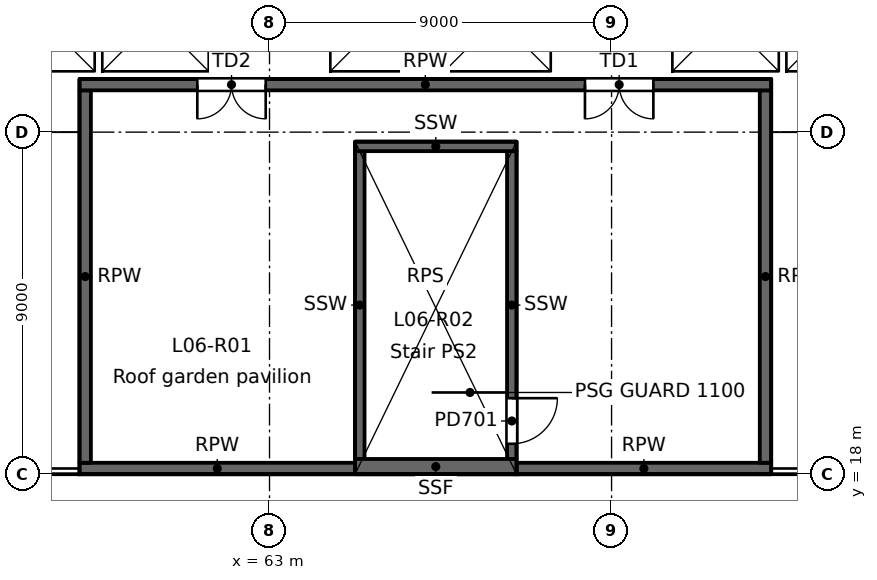
"""IFC4 building model, lengths in metres.
Left out: names, types, materials, properties, quantities, classifications, styles, units other than length and angle.
Written with IfcOpenShell. Run it as: python <this file> out.ifc"""

import sys

from ifc_helpers import new_model, si_unit, direction, frame, frame_2d, origin, origin_2d, place, context, subcontext, project, spatial, rectangle, extrude, element, fill, save


model = new_model("IFC4")
c1 = context("Model", 3, precision=1e-05, world=origin(), true_north=direction((0.0, 1.0)))
c2 = subcontext(c1, "Body", "Model", "MODEL_VIEW")
j1 = project(units=[si_unit("LENGTHUNIT", "METRE"), si_unit("PLANEANGLEUNIT", "RADIAN")], contexts=[c1])
p1 = place(None, origin())
s1 = spatial("IfcSite", under=j1, at=p1, CompositionType="ELEMENT")
p2 = place(p1, origin())
s2 = spatial("IfcBuilding", under=s1, at=p2, CompositionType="ELEMENT")
p3 = place(p2, frame((0.0, 0.0, 31.2)))
s3 = spatial("IfcBuildingStorey", under=s2, at=p3, CompositionType="ELEMENT", Elevation=31.2)
p4 = place(p3, frame((65.375, 18.4, 0.0), z_axis=(0.0, 0.0, 1.0), x_axis=(0.0, 1.0, 0.0)))
e1 = element("IfcWall", 1, at=p4, inside=s3, PredefinedType="SOLIDWALL", context=c2, shape_type="SweptSolid", body=[
    extrude(rectangle(XDim=8.1, YDim=0.25, at=frame_2d((4.05, 0.0))), origin(), (0.0, 0.0, 1.0), 2.7),
])
p5 = place(p3, frame((69.375, 26.5, 0.0), z_axis=(0.0, 0.0, 1.0), x_axis=(0.0, -1.0, 0.0)))
e2 = element("IfcWall", 2, at=p5, inside=s3, PredefinedType="SOLIDWALL", context=c2, shape_type="SweptSolid", body=[
    extrude(rectangle(XDim=8.1, YDim=0.25, at=frame_2d((4.05, 0.0))), origin(), (0.0, 0.0, 1.0), 2.7),
])
p6 = place(p5, frame((6.5, 0.0, 0.0)))
e3 = element("IfcOpeningElement", 3, at=p6, cuts=e2, PredefinedType="OPENING", context=c2, shape_type="SweptSolid", body=[
    extrude(rectangle(XDim=1.2, YDim=2.1, at=frame_2d((0.6, 1.05))), frame((0.0, 0.125, 0.0), z_axis=(0.0, -1.0, 0.0), x_axis=(1.0, 0.0, 0.0)), (0.0, 0.0, 1.0), 0.25),
])
p7 = place(p3, frame((65.25, 18.2, 0.0), z_axis=(0.0, 0.0, 1.0), x_axis=(1.0, 0.0, 0.0)))
e4 = element("IfcWall", 4, at=p7, inside=s3, PredefinedType="SOLIDWALL", context=c2, shape_type="SweptSolid", body=[
    extrude(rectangle(XDim=4.25, YDim=0.4, at=frame_2d((2.125, 0.0))), origin(), (0.0, 0.0, 1.0), 2.7),
])
p8 = place(p3, frame((65.25, 26.625, 0.0), z_axis=(0.0, 0.0, 1.0), x_axis=(1.0, 0.0, 0.0)))
e5 = element("IfcWall", 5, at=p8, inside=s3, PredefinedType="SOLIDWALL", context=c2, shape_type="SweptSolid", body=[
    extrude(rectangle(XDim=4.25, YDim=0.25, at=frame_2d((2.125, 0.0))), origin(), (0.0, 0.0, 1.0), 2.7),
])
p9 = place(p3, frame((58.0, 18.15, 0.0), z_axis=(0.0, 0.0, 1.0), x_axis=(1.0, 0.0, 0.0)))
e6 = element("IfcWall", 6, at=p9, inside=s3, PredefinedType="SOLIDWALL", context=c2, shape_type="SweptSolid", body=[
    extrude(rectangle(XDim=7.25, YDim=0.3, at=frame_2d((3.625, 0.0))), origin(), (0.0, 0.0, 1.0), 2.7),
])
p10 = place(p3, frame((69.5, 18.15, 0.0), z_axis=(0.0, 0.0, 1.0), x_axis=(1.0, 0.0, 0.0)))
e7 = element("IfcWall", 7, at=p10, inside=s3, PredefinedType="SOLIDWALL", context=c2, shape_type="SweptSolid", body=[
    extrude(rectangle(XDim=6.7, YDim=0.3, at=frame_2d((3.35, 0.0))), origin(), (0.0, 0.0, 1.0), 2.7),
])
for number, where, z_axis, x_axis in (
    (8, (58.15, 18.3, 0.0), (0.0, 0.0, 1.0), (0.0, 1.0, 0.0)),
    (9, (76.05, 28.1, 0.0), (0.0, 0.0, 1.0), (0.0, -1.0, 0.0)),
):
    element("IfcWall", number, at=place(p3, frame(where, z_axis=z_axis, x_axis=x_axis)), inside=s3, PredefinedType="SOLIDWALL", context=c2, shape_type="SweptSolid", body=[
        extrude(rectangle(XDim=9.8, YDim=0.3, at=frame_2d((4.9, 0.0))), origin(), (0.0, 0.0, 1.0), 2.7),
    ])
p11 = place(p3, frame((76.2, 28.25, 0.0), z_axis=(0.0, 0.0, 1.0), x_axis=(-1.0, 0.0, 0.0)))
e10 = element("IfcWall", 10, at=p11, inside=s3, PredefinedType="SOLIDWALL", context=c2, shape_type="SweptSolid", body=[
    extrude(rectangle(XDim=18.2, YDim=0.3, at=frame_2d((9.1, 0.0))), origin(), (0.0, 0.0, 1.0), 2.7),
])
p12 = place(p11, frame((3.1, 0.0, 0.0)))
e11 = element("IfcOpeningElement", 11, at=p12, cuts=e10, PredefinedType="OPENING", context=c2, shape_type="SweptSolid", body=[
    extrude(rectangle(XDim=1.8, YDim=2.4, at=frame_2d((0.9, 1.2))), frame((0.0, 0.15, 0.0), z_axis=(0.0, -1.0, 0.0), x_axis=(1.0, 0.0, 0.0)), (0.0, 0.0, 1.0), 0.3),
])
p13 = place(p11, frame((13.3, 0.0, 0.0)))
e12 = element("IfcOpeningElement", 12, at=p13, cuts=e10, PredefinedType="OPENING", context=c2, shape_type="SweptSolid", body=[
    extrude(rectangle(XDim=1.8, YDim=2.4, at=frame_2d((0.9, 1.2))), frame((0.0, 0.15, 0.0), z_axis=(0.0, -1.0, 0.0), x_axis=(1.0, 0.0, 0.0)), (0.0, 0.0, 1.0), 0.3),
])
p14 = place(p6, origin())
e13 = element("IfcDoor", 13, at=p14, inside=s3, OperationType="SINGLE_SWING_LEFT", PredefinedType="DOOR", context=c2, shape_type="SweptSolid", body=[
    extrude(rectangle(XDim=1.2, YDim=2.1, at=frame_2d((0.6, 1.05))), frame((0.0, 0.025, 0.0), z_axis=(0.0, -1.0, 0.0), x_axis=(1.0, 0.0, 0.0)), (0.0, 0.0, 1.0), 0.05),
])
fill(e3, e13)
p15 = place(p3, frame((0.0, 0.0, -0.45)))
p16 = place(p15, frame((57.0, 30.0, 0.0)))
p17 = place(p16, frame((0.0, 0.0, 0.4)))
e14 = element("IfcWindow", 14, at=p17, inside=s3, PartitioningType="SINGLE_PANEL", PredefinedType="SKYLIGHT", context=c2, shape_type="SweptSolid", body=[
    extrude(rectangle(XDim=2.8, YDim=2.8, at=origin_2d()), origin(), (0.0, 0.0, 1.0), 0.05),
])
p18 = place(p15, frame((60.0, 30.0, 0.0)))
p19 = place(p18, frame((0.0, 0.0, 0.4)))
e15 = element("IfcWindow", 15, at=p19, inside=s3, PartitioningType="SINGLE_PANEL", PredefinedType="SKYLIGHT", context=c2, shape_type="SweptSolid", body=[
    extrude(rectangle(XDim=2.8, YDim=2.8, at=origin_2d()), origin(), (0.0, 0.0, 1.0), 0.05),
])
p20 = place(p15, frame((66.0, 30.0, 0.0)))
p21 = place(p20, frame((0.0, 0.0, 0.4)))
e16 = element("IfcWindow", 16, at=p21, inside=s3, PartitioningType="SINGLE_PANEL", PredefinedType="SKYLIGHT", context=c2, shape_type="SweptSolid", body=[
    extrude(rectangle(XDim=2.8, YDim=2.8, at=origin_2d()), origin(), (0.0, 0.0, 1.0), 0.05),
])
p22 = place(p15, frame((69.0, 30.0, 0.0)))
p23 = place(p22, frame((0.0, 0.0, 0.4)))
e17 = element("IfcWindow", 17, at=p23, inside=s3, PartitioningType="SINGLE_PANEL", PredefinedType="SKYLIGHT", context=c2, shape_type="SweptSolid", body=[
    extrude(rectangle(XDim=2.8, YDim=2.8, at=origin_2d()), origin(), (0.0, 0.0, 1.0), 0.05),
])
p24 = place(p15, frame((75.0, 30.0, 0.0)))
p25 = place(p24, frame((0.0, 0.0, 0.4)))
e18 = element("IfcWindow", 18, at=p25, inside=s3, PartitioningType="SINGLE_PANEL", PredefinedType="SKYLIGHT", context=c2, shape_type="SweptSolid", body=[
    extrude(rectangle(XDim=2.8, YDim=2.8, at=origin_2d()), origin(), (0.0, 0.0, 1.0), 0.05),
])
p26 = place(p15, frame((78.0, 30.0, 0.0)))
p27 = place(p26, frame((0.0, 0.0, 0.4)))
e19 = element("IfcWindow", 19, at=p27, inside=s3, PartitioningType="SINGLE_PANEL", PredefinedType="SKYLIGHT", context=c2, shape_type="SweptSolid", body=[
    extrude(rectangle(XDim=2.8, YDim=2.8, at=origin_2d()), origin(), (0.0, 0.0, 1.0), 0.05),
])
p28 = place(p12, origin())
e20 = element("IfcDoor", 20, at=p28, inside=s3, OperationType="DOUBLE_DOOR_SINGLE_SWING", PredefinedType="DOOR", context=c2, shape_type="SweptSolid", body=[
    extrude(rectangle(XDim=1.8, YDim=2.4, at=frame_2d((0.9, 1.2))), frame((0.0, 0.025, 0.0), z_axis=(0.0, -1.0, 0.0), x_axis=(1.0, 0.0, 0.0)), (0.0, 0.0, 1.0), 0.05),
])
fill(e11, e20)
p29 = place(p13, origin())
e21 = element("IfcDoor", 21, at=p29, inside=s3, OperationType="DOUBLE_DOOR_SINGLE_SWING", PredefinedType="DOOR", context=c2, shape_type="SweptSolid", body=[
    extrude(rectangle(XDim=1.8, YDim=2.4, at=frame_2d((0.9, 1.2))), frame((0.0, 0.025, 0.0), z_axis=(0.0, -1.0, 0.0), x_axis=(1.0, 0.0, 0.0)), (0.0, 0.0, 1.0), 0.05),
])
fill(e12, e21)
save(model, sys.argv[1])
